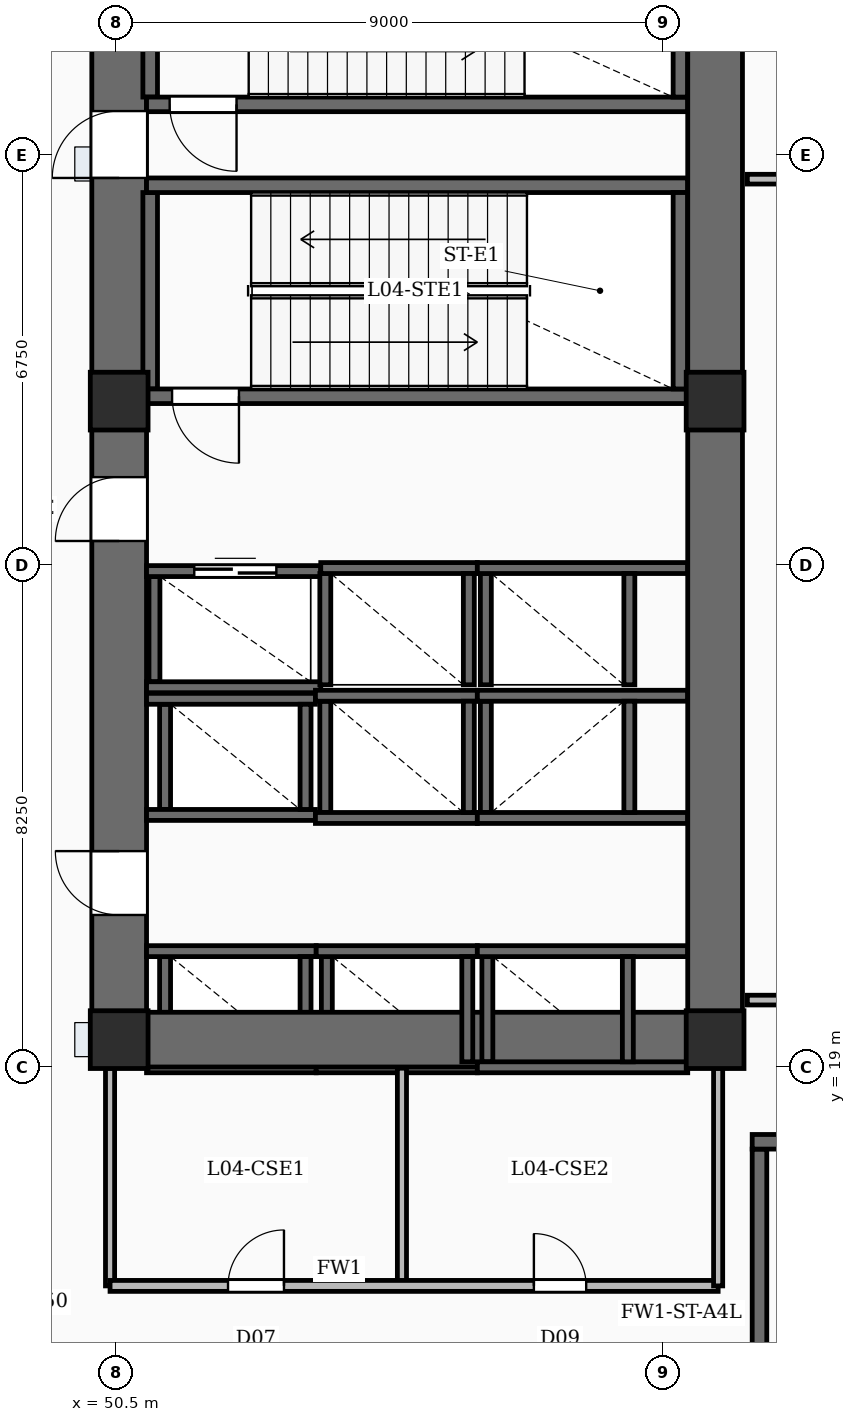
"""IFC4 building model, lengths in metres.
Left out: names, types, materials, properties, quantities, classifications, styles, units other than length and angle.
Written with IfcOpenShell. Run it as: python <this file> out.ifc"""

import sys

from ifc_helpers import new_model, si_unit, direction, frame, frame_2d, origin, origin_2d, place, context, subcontext, project, spatial, rectangle, extrude, element, fill, save


model = new_model("IFC4")
c1 = context("Model", 3, precision=1e-05, world=origin(), true_north=direction((0.0, 1.0)))
c2 = subcontext(c1, "Body", "Model", "MODEL_VIEW")
j1 = project(units=[si_unit("LENGTHUNIT", "METRE"), si_unit("PLANEANGLEUNIT", "RADIAN")], contexts=[c1])
p1 = place(None, origin())
s1 = spatial("IfcSite", under=j1, at=p1, CompositionType="ELEMENT")
p2 = place(p1, origin())
s2 = spatial("IfcBuilding", under=s1, at=p2, CompositionType="ELEMENT")
p3 = place(p2, frame((0.0, 0.0, 23.0)))
s3 = spatial("IfcBuildingStorey", under=s2, at=p3, CompositionType="ELEMENT", Elevation=23.0)
p4 = place(p3, frame((50.55, 19.0, -0.35), z_axis=(0.0, 0.0, 1.0), x_axis=(0.0, 1.0, 0.0)))
e1 = element("IfcWall", 1, at=p4, inside=s3, PredefinedType="SHEAR", context=c2, shape_type="SweptSolid", body=[
    extrude(rectangle(XDim=20.8, YDim=0.9, at=frame_2d((10.4, 0.0))), origin(), (0.0, 0.0, 1.0), 5.0),
])
p5 = place(p4, frame((2.5, 0.0, 0.35)))
e2 = element("IfcOpeningElement", 2, at=p5, cuts=e1, PredefinedType="OPENING", context=c2, shape_type="SweptSolid", body=[
    extrude(rectangle(XDim=1.05, YDim=2.15, at=frame_2d((0.525, 1.075))), frame((0.0, 0.46, 0.0), z_axis=(0.0, -1.0, 0.0), x_axis=(1.0, 0.0, 0.0)), (0.0, 0.0, 1.0), 0.92),
])
p6 = place(p4, frame((8.65, 0.0, 0.35)))
e3 = element("IfcOpeningElement", 3, at=p6, cuts=e1, PredefinedType="OPENING", context=c2, shape_type="SweptSolid", body=[
    extrude(rectangle(XDim=1.05, YDim=2.15, at=frame_2d((0.525, 1.075))), frame((0.0, 0.46, 0.0), z_axis=(0.0, -1.0, 0.0), x_axis=(1.0, 0.0, 0.0)), (0.0, 0.0, 1.0), 0.92),
])
p7 = place(p4, frame((14.62, 0.0, 0.35)))
e4 = element("IfcOpeningElement", 4, at=p7, cuts=e1, PredefinedType="OPENING", context=c2, shape_type="SweptSolid", body=[
    extrude(rectangle(XDim=1.1, YDim=2.15, at=frame_2d((0.55, 1.075))), frame((0.0, 0.46, 0.0), z_axis=(0.0, -1.0, 0.0), x_axis=(1.0, 0.0, 0.0)), (0.0, 0.0, 1.0), 0.92),
])
p8 = place(p3, frame((60.35, 19.0, -0.35), z_axis=(0.0, 0.0, 1.0), x_axis=(0.0, 1.0, 0.0)))
e5 = element("IfcWall", 5, at=p8, inside=s3, PredefinedType="SHEAR", context=c2, shape_type="SweptSolid", body=[
    extrude(rectangle(XDim=20.8, YDim=0.9, at=frame_2d((10.4, 0.0))), origin(), (0.0, 0.0, 1.0), 5.0),
])
p9 = place(p3, frame((51.0, 19.45, -0.35), z_axis=(0.0, 0.0, 1.0), x_axis=(1.0, 0.0, 0.0)))
e6 = element("IfcWall", 6, at=p9, inside=s3, PredefinedType="SHEAR", context=c2, shape_type="SweptSolid", body=[
    extrude(rectangle(XDim=8.9, YDim=0.9, at=frame_2d((4.45, 0.0))), origin(), (0.0, 0.0, 1.0), 5.0),
])
for number, where, z_axis, x_axis in (
    (7, (50.55, 19.45, -0.35), (0.0, 0.0, 1.0), (1.0, 0.0, 0.0)),
    (8, (60.35, 19.45, -0.35), (0.0, 0.0, 1.0), (1.0, 0.0, 0.0)),
    (9, (50.55, 29.95, -0.35), (0.0, 0.0, 1.0), (1.0, 0.0, 0.0)),
    (10, (60.35, 29.95, -0.35), (0.0, 0.0, 1.0), (1.0, 0.0, 0.0)),
):
    element("IfcColumn", number, at=place(p3, frame(where, z_axis=z_axis, x_axis=x_axis)), inside=s3, PredefinedType="COLUMN", context=c2, shape_type="SweptSolid", body=[
        extrude(rectangle(XDim=0.95, YDim=0.95, at=origin_2d()), origin(), (0.0, 0.0, 1.0), 5.0),
    ])
p10 = place(p3, frame((60.96, 17.77, 0.0), z_axis=(0.0, 0.0, 1.0), x_axis=(1.0, 0.0, 0.0)))
e11 = element("IfcWall", 11, at=p10, inside=s3, PredefinedType="SOLIDWALL", context=c2, shape_type="SweptSolid", body=[
    extrude(rectangle(XDim=9.88, YDim=0.24, at=frame_2d((4.94, 0.0))), origin(), (0.0, 0.0, 1.0), 4.65),
])
p11 = place(p10, frame((0.69, 0.0, 0.0)))
e12 = element("IfcOpeningElement", 12, at=p11, cuts=e11, PredefinedType="OPENING", context=c2, shape_type="SweptSolid", body=[
    extrude(rectangle(XDim=1.1, YDim=2.15, at=frame_2d((0.55, 1.075))), frame((0.0, 0.13, 0.0), z_axis=(0.0, -1.0, 0.0), x_axis=(1.0, 0.0, 0.0)), (0.0, 0.0, 1.0), 0.26),
])
p12 = place(p3, frame((61.08, 13.5, 0.0), z_axis=(0.0, 0.0, 1.0), x_axis=(0.0, 1.0, 0.0)))
e13 = element("IfcWall", 13, at=p12, inside=s3, PredefinedType="SOLIDWALL", context=c2, shape_type="SweptSolid", body=[
    extrude(rectangle(XDim=4.15, YDim=0.24, at=frame_2d((2.075, 0.0))), origin(), (0.0, 0.0, 1.0), 4.65),
])
p13 = place(p3, frame((59.9, 30.03, 0.0), z_axis=(0.0, 0.0, 1.0), x_axis=(-1.0, 0.0, 0.0)))
e14 = element("IfcWall", 14, at=p13, inside=s3, PredefinedType="SOLIDWALL", context=c2, shape_type="SweptSolid", body=[
    extrude(rectangle(XDim=8.9, YDim=0.24, at=frame_2d((4.45, 0.0))), origin(), (0.0, 0.0, 1.0), 4.65),
])
p14 = place(p13, frame((7.38, 0.0, 0.0)))
e15 = element("IfcOpeningElement", 15, at=p14, cuts=e14, PredefinedType="OPENING", context=c2, shape_type="SweptSolid", body=[
    extrude(rectangle(XDim=1.1, YDim=2.15, at=frame_2d((0.55, 1.075))), frame((0.0, 0.13, 0.0), z_axis=(0.0, -1.0, 0.0), x_axis=(1.0, 0.0, 0.0)), (0.0, 0.0, 1.0), 0.26),
])
p15 = place(p3, frame((51.0, 33.5, 0.0), z_axis=(0.0, 0.0, 1.0), x_axis=(1.0, 0.0, 0.0)))
e16 = element("IfcWall", 16, at=p15, inside=s3, PredefinedType="SOLIDWALL", context=c2, shape_type="SweptSolid", body=[
    extrude(rectangle(XDim=8.9, YDim=0.24, at=frame_2d((4.45, 0.0))), origin(), (0.0, 0.0, 1.0), 4.65),
])
for number, where, z_axis, x_axis in (
    (17, (51.06, 30.15, 0.0), (0.0, 0.0, 1.0), (0.0, 1.0, 0.0)),
    (18, (59.78, 30.15, 0.0), (0.0, 0.0, 1.0), (0.0, 1.0, 0.0)),
):
    element("IfcWall", number, at=place(p3, frame(where, z_axis=z_axis, x_axis=x_axis)), inside=s3, PredefinedType="SOLIDWALL", context=c2, shape_type="SweptSolid", body=[
        extrude(rectangle(XDim=3.23, YDim=0.24, at=frame_2d((1.615, 0.0))), origin(), (0.0, 0.0, 1.0), 4.65),
    ])
p16 = place(p3, frame((59.9, 34.83, 0.0), z_axis=(0.0, 0.0, 1.0), x_axis=(-1.0, 0.0, 0.0)))
e19 = element("IfcWall", 19, at=p16, inside=s3, PredefinedType="SOLIDWALL", context=c2, shape_type="SweptSolid", body=[
    extrude(rectangle(XDim=8.9, YDim=0.24, at=frame_2d((4.45, 0.0))), origin(), (0.0, 0.0, 1.0), 4.65),
])
p17 = place(p16, frame((7.42, 0.0, 0.0)))
e20 = element("IfcOpeningElement", 20, at=p17, cuts=e19, PredefinedType="OPENING", context=c2, shape_type="SweptSolid", body=[
    extrude(rectangle(XDim=1.1, YDim=2.15, at=frame_2d((0.55, 1.075))), frame((0.0, 0.13, 0.0), z_axis=(0.0, -1.0, 0.0), x_axis=(1.0, 0.0, 0.0)), (0.0, 0.0, 1.0), 0.26),
])
for number, where, z_axis, x_axis in (
    (21, (51.06, 34.95, 0.0), (0.0, 0.0, 1.0), (0.0, 1.0, 0.0)),
    (22, (59.78, 34.95, 0.0), (0.0, 0.0, 1.0), (0.0, 1.0, 0.0)),
):
    element("IfcWall", number, at=place(p3, frame(where, z_axis=z_axis, x_axis=x_axis)), inside=s3, PredefinedType="SOLIDWALL", context=c2, shape_type="SweptSolid", body=[
        extrude(rectangle(XDim=3.15, YDim=0.24, at=frame_2d((1.575, 0.0))), origin(), (0.0, 0.0, 1.0), 4.65),
    ])
for number, where, z_axis, x_axis in (
    (23, (51.0, 20.905, 0.0), (0.0, 0.0, 1.0), (1.0, 0.0, 0.0)),
    (24, (51.0, 18.995, 0.0), (0.0, 0.0, 1.0), (1.0, 0.0, 0.0)),
):
    element("IfcWall", number, at=place(p3, frame(where, z_axis=z_axis, x_axis=x_axis)), inside=s3, PredefinedType="SOLIDWALL", context=c2, shape_type="SweptSolid", body=[
        extrude(rectangle(XDim=2.79, YDim=0.18, at=frame_2d((1.395, 0.0))), origin(), (0.0, 0.0, 1.0), 4.65),
    ])
for number, where, z_axis, x_axis in (
    (25, (51.305, 19.085, 0.0), (0.0, 0.0, 1.0), (0.0, 1.0, 0.0)),
    (26, (53.615, 19.085, 0.0), (0.0, 0.0, 1.0), (0.0, 1.0, 0.0)),
):
    element("IfcWall", number, at=place(p3, frame(where, z_axis=z_axis, x_axis=x_axis)), inside=s3, PredefinedType="SOLIDWALL", context=c2, shape_type="SweptSolid", body=[
        extrude(rectangle(XDim=1.73, YDim=0.18, at=frame_2d((0.865, 0.0))), origin(), (0.0, 0.0, 1.0), 4.65),
    ])
for number, where, z_axis, x_axis in (
    (27, (53.79, 20.905, 0.0), (0.0, 0.0, 1.0), (1.0, 0.0, 0.0)),
    (28, (53.79, 18.995, 0.0), (0.0, 0.0, 1.0), (1.0, 0.0, 0.0)),
):
    element("IfcWall", number, at=place(p3, frame(where, z_axis=z_axis, x_axis=x_axis)), inside=s3, PredefinedType="SOLIDWALL", context=c2, shape_type="SweptSolid", body=[
        extrude(rectangle(XDim=2.65, YDim=0.18, at=frame_2d((1.325, 0.0))), origin(), (0.0, 0.0, 1.0), 4.65),
    ])
for number, where, z_axis, x_axis in (
    (29, (53.965, 19.085, 0.0), (0.0, 0.0, 1.0), (0.0, 1.0, 0.0)),
    (30, (56.275, 19.085, 0.0), (0.0, 0.0, 1.0), (0.0, 1.0, 0.0)),
):
    element("IfcWall", number, at=place(p3, frame(where, z_axis=z_axis, x_axis=x_axis)), inside=s3, PredefinedType="SOLIDWALL", context=c2, shape_type="SweptSolid", body=[
        extrude(rectangle(XDim=1.73, YDim=0.18, at=frame_2d((0.865, 0.0))), origin(), (0.0, 0.0, 1.0), 4.65),
    ])
for number, where, z_axis, x_axis in (
    (31, (56.44, 20.905, 0.0), (0.0, 0.0, 1.0), (1.0, 0.0, 0.0)),
    (32, (56.44, 18.995, 0.0), (0.0, 0.0, 1.0), (1.0, 0.0, 0.0)),
):
    element("IfcWall", number, at=place(p3, frame(where, z_axis=z_axis, x_axis=x_axis)), inside=s3, PredefinedType="SOLIDWALL", context=c2, shape_type="SweptSolid", body=[
        extrude(rectangle(XDim=3.46, YDim=0.18, at=frame_2d((1.73, 0.0))), origin(), (0.0, 0.0, 1.0), 4.65),
    ])
for number, where, z_axis, x_axis in (
    (33, (56.605, 19.085, 0.0), (0.0, 0.0, 1.0), (0.0, 1.0, 0.0)),
    (34, (58.915, 19.085, 0.0), (0.0, 0.0, 1.0), (0.0, 1.0, 0.0)),
):
    element("IfcWall", number, at=place(p3, frame(where, z_axis=z_axis, x_axis=x_axis)), inside=s3, PredefinedType="SOLIDWALL", context=c2, shape_type="SweptSolid", body=[
        extrude(rectangle(XDim=1.73, YDim=0.18, at=frame_2d((0.865, 0.0))), origin(), (0.0, 0.0, 1.0), 4.65),
    ])
for number, where, z_axis, x_axis in (
    (35, (51.0, 25.055, 0.0), (0.0, 0.0, 1.0), (1.0, 0.0, 0.0)),
    (36, (51.0, 23.145, 0.0), (0.0, 0.0, 1.0), (1.0, 0.0, 0.0)),
):
    element("IfcWall", number, at=place(p3, frame(where, z_axis=z_axis, x_axis=x_axis)), inside=s3, PredefinedType="SOLIDWALL", context=c2, shape_type="SweptSolid", body=[
        extrude(rectangle(XDim=2.778, YDim=0.18, at=frame_2d((1.389, 0.0))), origin(), (0.0, 0.0, 1.0), 4.65),
    ])
for number, where, z_axis, x_axis in (
    (37, (51.305, 23.235, 0.0), (0.0, 0.0, 1.0), (0.0, 1.0, 0.0)),
    (38, (53.615, 23.235, 0.0), (0.0, 0.0, 1.0), (0.0, 1.0, 0.0)),
):
    element("IfcWall", number, at=place(p3, frame(where, z_axis=z_axis, x_axis=x_axis)), inside=s3, PredefinedType="SOLIDWALL", context=c2, shape_type="SweptSolid", body=[
        extrude(rectangle(XDim=1.73, YDim=0.18, at=frame_2d((0.865, 0.0))), origin(), (0.0, 0.0, 1.0), 4.65),
    ])
for number, where, z_axis, x_axis in (
    (39, (53.778, 25.105, 0.0), (0.0, 0.0, 1.0), (1.0, 0.0, 0.0)),
    (40, (53.778, 23.095, 0.0), (0.0, 0.0, 1.0), (1.0, 0.0, 0.0)),
):
    element("IfcWall", number, at=place(p3, frame(where, z_axis=z_axis, x_axis=x_axis)), inside=s3, PredefinedType="SOLIDWALL", context=c2, shape_type="SweptSolid", body=[
        extrude(rectangle(XDim=2.662, YDim=0.18, at=frame_2d((1.331, 0.0))), origin(), (0.0, 0.0, 1.0), 4.65),
    ])
for number, where, z_axis, x_axis in (
    (41, (53.94, 23.185, 0.0), (0.0, 0.0, 1.0), (0.0, 1.0, 0.0)),
    (42, (56.3, 23.185, 0.0), (0.0, 0.0, 1.0), (0.0, 1.0, 0.0)),
):
    element("IfcWall", number, at=place(p3, frame(where, z_axis=z_axis, x_axis=x_axis)), inside=s3, PredefinedType="SOLIDWALL", context=c2, shape_type="SweptSolid", body=[
        extrude(rectangle(XDim=1.83, YDim=0.18, at=frame_2d((0.915, 0.0))), origin(), (0.0, 0.0, 1.0), 4.65),
    ])
for number, where, z_axis, x_axis in (
    (43, (56.44, 25.105, 0.0), (0.0, 0.0, 1.0), (1.0, 0.0, 0.0)),
    (44, (56.44, 23.095, 0.0), (0.0, 0.0, 1.0), (1.0, 0.0, 0.0)),
):
    element("IfcWall", number, at=place(p3, frame(where, z_axis=z_axis, x_axis=x_axis)), inside=s3, PredefinedType="SOLIDWALL", context=c2, shape_type="SweptSolid", body=[
        extrude(rectangle(XDim=3.46, YDim=0.18, at=frame_2d((1.73, 0.0))), origin(), (0.0, 0.0, 1.0), 4.65),
    ])
for number, where, z_axis, x_axis in (
    (45, (56.58, 23.185, 0.0), (0.0, 0.0, 1.0), (0.0, 1.0, 0.0)),
    (46, (58.94, 23.185, 0.0), (0.0, 0.0, 1.0), (0.0, 1.0, 0.0)),
):
    element("IfcWall", number, at=place(p3, frame(where, z_axis=z_axis, x_axis=x_axis)), inside=s3, PredefinedType="SOLIDWALL", context=c2, shape_type="SweptSolid", body=[
        extrude(rectangle(XDim=1.83, YDim=0.18, at=frame_2d((0.915, 0.0))), origin(), (0.0, 0.0, 1.0), 4.65),
    ])
p18 = place(p3, frame((53.865, 27.205, 0.0), z_axis=(0.0, 0.0, 1.0), x_axis=(1.0, 0.0, 0.0)))
e47 = element("IfcWall", 47, at=p18, inside=s3, PredefinedType="SOLIDWALL", context=c2, shape_type="SweptSolid", body=[
    extrude(rectangle(XDim=2.575, YDim=0.18, at=frame_2d((1.288, 0.0))), origin(), (0.0, 0.0, 1.0), 4.65),
])
for number, where, z_axis, x_axis in (
    (48, (53.94, 25.285, 0.0), (0.0, 0.0, 1.0), (0.0, 1.0, 0.0)),
    (49, (56.3, 25.285, 0.0), (0.0, 0.0, 1.0), (0.0, 1.0, 0.0)),
):
    element("IfcWall", number, at=place(p3, frame(where, z_axis=z_axis, x_axis=x_axis)), inside=s3, PredefinedType="SOLIDWALL", context=c2, shape_type="SweptSolid", body=[
        extrude(rectangle(XDim=1.83, YDim=0.18, at=frame_2d((0.915, 0.0))), origin(), (0.0, 0.0, 1.0), 4.65),
    ])
p19 = place(p3, frame((56.44, 27.205, 0.0), z_axis=(0.0, 0.0, 1.0), x_axis=(1.0, 0.0, 0.0)))
e50 = element("IfcWall", 50, at=p19, inside=s3, PredefinedType="SOLIDWALL", context=c2, shape_type="SweptSolid", body=[
    extrude(rectangle(XDim=3.46, YDim=0.18, at=frame_2d((1.73, 0.0))), origin(), (0.0, 0.0, 1.0), 4.65),
])
for number, where, z_axis, x_axis in (
    (51, (56.58, 25.285, 0.0), (0.0, 0.0, 1.0), (0.0, 1.0, 0.0)),
    (52, (58.94, 25.285, 0.0), (0.0, 0.0, 1.0), (0.0, 1.0, 0.0)),
):
    element("IfcWall", number, at=place(p3, frame(where, z_axis=z_axis, x_axis=x_axis)), inside=s3, PredefinedType="SOLIDWALL", context=c2, shape_type="SweptSolid", body=[
        extrude(rectangle(XDim=1.83, YDim=0.18, at=frame_2d((0.915, 0.0))), origin(), (0.0, 0.0, 1.0), 4.65),
    ])
p20 = place(p3, frame((51.0, 27.155, 0.0), z_axis=(0.0, 0.0, 1.0), x_axis=(1.0, 0.0, 0.0)))
e53 = element("IfcWall", 53, at=p20, inside=s3, PredefinedType="SOLIDWALL", context=c2, shape_type="SweptSolid", body=[
    extrude(rectangle(XDim=2.865, YDim=0.18, at=frame_2d((1.433, 0.0))), origin(), (0.0, 0.0, 1.0), 4.65),
])
p21 = place(p20, frame((0.785, 0.0, 0.0)))
e54 = element("IfcOpeningElement", 54, at=p21, cuts=e53, PredefinedType="OPENING", context=c2, shape_type="SweptSolid", body=[
    extrude(rectangle(XDim=1.35, YDim=2.3, at=frame_2d((0.675, 1.15))), frame((0.0, 0.1, 0.0), z_axis=(0.0, -1.0, 0.0), x_axis=(1.0, 0.0, 0.0)), (0.0, 0.0, 1.0), 0.2),
])
p22 = place(p3, frame((51.0, 25.245, 0.0), z_axis=(0.0, 0.0, 1.0), x_axis=(1.0, 0.0, 0.0)))
e55 = element("IfcWall", 55, at=p22, inside=s3, PredefinedType="SOLIDWALL", context=c2, shape_type="SweptSolid", body=[
    extrude(rectangle(XDim=2.865, YDim=0.18, at=frame_2d((1.433, 0.0))), origin(), (0.0, 0.0, 1.0), 4.65),
])
p23 = place(p3, frame((51.13, 25.335, 0.0), z_axis=(0.0, 0.0, 1.0), x_axis=(0.0, 1.0, 0.0)))
e56 = element("IfcWall", 56, at=p23, inside=s3, PredefinedType="SOLIDWALL", context=c2, shape_type="SweptSolid", body=[
    extrude(rectangle(XDim=1.73, YDim=0.18, at=frame_2d((0.865, 0.0))), origin(), (0.0, 0.0, 1.0), 4.65),
])
p24 = place(p3, frame((55.2, 15.4, 0.0), z_axis=(0.0, 0.0, 1.0), x_axis=(0.0, 1.0, 0.0)))
e57 = element("IfcWall", 57, at=p24, inside=s3, PredefinedType="PARTITIONING", context=c2, shape_type="SweptSolid", body=[
    extrude(rectangle(XDim=3.58, YDim=0.15, at=frame_2d((1.79, 0.0))), origin(), (0.0, 0.0, 1.0), 3.71),
])
p25 = place(p3, frame((50.4, 15.4, 0.0), z_axis=(0.0, 0.0, 1.0), x_axis=(1.0, 0.0, 0.0)))
e58 = element("IfcWall", 58, at=p25, inside=s3, PredefinedType="SOLIDWALL", context=c2, shape_type="SweptSolid", body=[
    extrude(rectangle(XDim=10.0, YDim=0.18, at=frame_2d((5.0, 0.0))), origin(), (0.0, 0.0, 1.0), 3.71),
])
p26 = place(p25, frame((1.94, 0.0, 0.0)))
e59 = element("IfcOpeningElement", 59, at=p26, cuts=e58, PredefinedType="OPENING", context=c2, shape_type="SweptSolid", body=[
    extrude(rectangle(XDim=0.92, YDim=2.1, at=frame_2d((0.46, 1.05))), frame((0.0, 0.1, 0.0), z_axis=(0.0, -1.0, 0.0), x_axis=(1.0, 0.0, 0.0)), (0.0, 0.0, 1.0), 0.2),
])
p27 = place(p25, frame((6.97, 0.0, 0.0)))
e60 = element("IfcOpeningElement", 60, at=p27, cuts=e58, PredefinedType="OPENING", context=c2, shape_type="SweptSolid", body=[
    extrude(rectangle(XDim=0.86, YDim=2.05, at=frame_2d((0.43, 1.025))), frame((0.0, 0.1, 0.0), z_axis=(0.0, -1.0, 0.0), x_axis=(1.0, 0.0, 0.0)), (0.0, 0.0, 1.0), 0.2),
])
for number, where, z_axis, x_axis in (
    (61, (50.4, 15.4, 0.0), (0.0, 0.0, 1.0), (0.0, 1.0, 0.0)),
    (62, (60.4, 15.4, 0.0), (0.0, 0.0, 1.0), (0.0, 1.0, 0.0)),
):
    element("IfcWall", number, at=place(p3, frame(where, z_axis=z_axis, x_axis=x_axis)), inside=s3, PredefinedType="PARTITIONING", context=c2, shape_type="SweptSolid", body=[
        extrude(rectangle(XDim=3.58, YDim=0.15, at=frame_2d((1.79, 0.0))), origin(), (0.0, 0.0, 1.0), 3.71),
    ])
for number, where, z_axis, x_axis in (
    (63, (60.88, 20.1, 0.0), (0.0, 0.0, 1.0), (1.0, 0.0, 0.0)),
    (64, (60.88, 33.6, 0.0), (0.0, 0.0, 1.0), (1.0, 0.0, 0.0)),
):
    element("IfcWall", number, at=place(p3, frame(where, z_axis=z_axis, x_axis=x_axis)), inside=s3, PredefinedType="PARTITIONING", context=c2, shape_type="SweptSolid", body=[
        extrude(rectangle(XDim=10.04, YDim=0.16, at=frame_2d((5.02, 0.0))), origin(), (0.0, 0.0, 1.0), 3.71),
    ])
p28 = place(p5, origin())
e65 = element("IfcDoor", 65, at=p28, inside=s3, OperationType="SINGLE_SWING_RIGHT", PredefinedType="DOOR", context=c2, shape_type="SweptSolid", body=[
    extrude(rectangle(XDim=1.05, YDim=2.15, at=frame_2d((0.525, 1.075))), frame((0.0, 0.025, 0.0), z_axis=(0.0, -1.0, 0.0), x_axis=(1.0, 0.0, 0.0)), (0.0, 0.0, 1.0), 0.05),
])
fill(e2, e65)
p29 = place(p6, origin())
e66 = element("IfcDoor", 66, at=p29, inside=s3, OperationType="SINGLE_SWING_LEFT", PredefinedType="DOOR", context=c2, shape_type="SweptSolid", body=[
    extrude(rectangle(XDim=1.05, YDim=2.15, at=frame_2d((0.525, 1.075))), frame((0.0, 0.025, 0.0), z_axis=(0.0, -1.0, 0.0), x_axis=(1.0, 0.0, 0.0)), (0.0, 0.0, 1.0), 0.05),
])
fill(e3, e66)
p30 = place(p7, origin())
e67 = element("IfcDoor", 67, at=p30, inside=s3, OperationType="SINGLE_SWING_LEFT", PredefinedType="DOOR", context=c2, shape_type="SweptSolid", body=[
    extrude(rectangle(XDim=1.1, YDim=2.15, at=frame_2d((0.55, 1.075))), frame((0.0, 0.025, 0.0), z_axis=(0.0, -1.0, 0.0), x_axis=(1.0, 0.0, 0.0)), (0.0, 0.0, 1.0), 0.05),
])
fill(e4, e67)
p31 = place(p14, origin())
e68 = element("IfcDoor", 68, at=p31, inside=s3, OperationType="SINGLE_SWING_LEFT", PredefinedType="DOOR", context=c2, shape_type="SweptSolid", body=[
    extrude(rectangle(XDim=1.1, YDim=2.15, at=frame_2d((0.55, 1.075))), frame((0.0, 0.025, 0.0), z_axis=(0.0, -1.0, 0.0), x_axis=(1.0, 0.0, 0.0)), (0.0, 0.0, 1.0), 0.05),
])
fill(e15, e68)
p32 = place(p17, origin())
e69 = element("IfcDoor", 69, at=p32, inside=s3, OperationType="SINGLE_SWING_LEFT", PredefinedType="DOOR", context=c2, shape_type="SweptSolid", body=[
    extrude(rectangle(XDim=1.1, YDim=2.15, at=frame_2d((0.55, 1.075))), frame((0.0, 0.025, 0.0), z_axis=(0.0, -1.0, 0.0), x_axis=(1.0, 0.0, 0.0)), (0.0, 0.0, 1.0), 0.05),
])
fill(e20, e69)
p33 = place(p21, origin())
e70 = element("IfcDoor", 70, at=p33, inside=s3, OperationType="DOUBLE_DOOR_SLIDING", PredefinedType="DOOR", context=c2, shape_type="SweptSolid", body=[
    extrude(rectangle(XDim=1.35, YDim=2.3, at=frame_2d((0.675, 1.15))), frame((0.0, 0.025, 0.0), z_axis=(0.0, -1.0, 0.0), x_axis=(1.0, 0.0, 0.0)), (0.0, 0.0, 1.0), 0.05),
])
fill(e54, e70)
p34 = place(p26, origin())
e71 = element("IfcDoor", 71, at=p34, inside=s3, OperationType="SINGLE_SWING_RIGHT", PredefinedType="DOOR", context=c2, shape_type="SweptSolid", body=[
    extrude(rectangle(XDim=0.92, YDim=2.1, at=frame_2d((0.46, 1.05))), frame((0.0, 0.025, 0.0), z_axis=(0.0, -1.0, 0.0), x_axis=(1.0, 0.0, 0.0)), (0.0, 0.0, 1.0), 0.05),
])
fill(e59, e71)
p35 = place(p27, origin())
e72 = element("IfcDoor", 72, at=p35, inside=s3, OperationType="SINGLE_SWING_LEFT", PredefinedType="DOOR", context=c2, shape_type="SweptSolid", body=[
    extrude(rectangle(XDim=0.86, YDim=2.05, at=frame_2d((0.43, 1.025))), frame((0.0, 0.025, 0.0), z_axis=(0.0, -1.0, 0.0), x_axis=(1.0, 0.0, 0.0)), (0.0, 0.0, 1.0), 0.05),
])
fill(e60, e72)
save(model, sys.argv[1])
